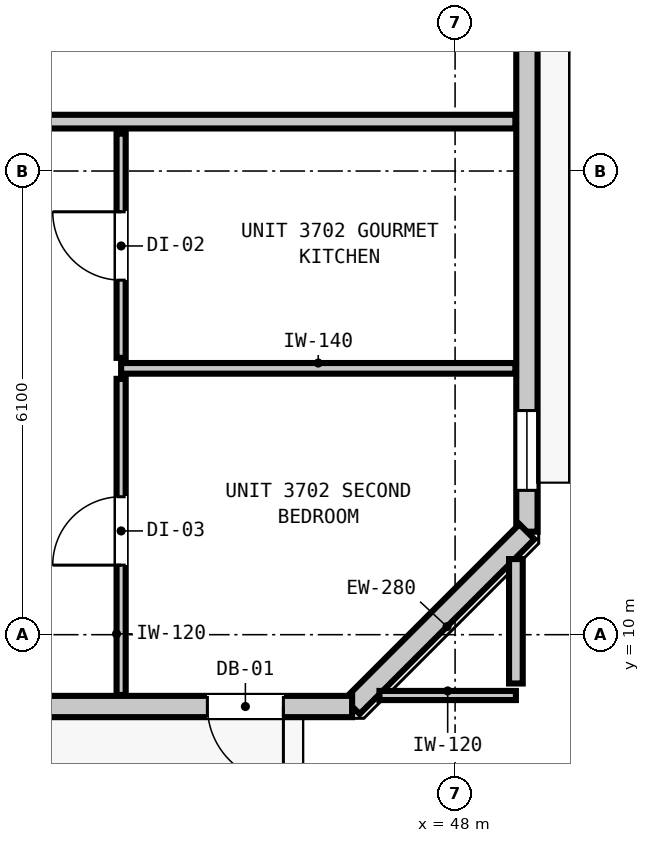
"""IFC4 building model, lengths in metres.
Left out: names, types, materials, properties, quantities, classifications, styles, units other than length and angle.
Written with IfcOpenShell. Run it as: python <this file> out.ifc"""

import sys

from ifc_helpers import new_model, si_unit, direction, frame, frame_2d, origin, place, context, subcontext, project, spatial, rectangle, extrude, element, fill, save


model = new_model("IFC4")
c1 = context("Model", 3, precision=1e-05, world=origin(), true_north=direction((0.0, 1.0)))
c2 = subcontext(c1, "Body", "Model", "MODEL_VIEW")
j1 = project(units=[si_unit("LENGTHUNIT", "METRE"), si_unit("PLANEANGLEUNIT", "RADIAN")], contexts=[c1])
p1 = place(None, origin())
s1 = spatial("IfcSite", under=j1, at=p1, CompositionType="ELEMENT")
p2 = place(p1, origin())
s2 = spatial("IfcBuilding", under=s1, at=p2, CompositionType="ELEMENT")
p3 = place(p2, frame((0.0, 0.0, 129.32)))
s3 = spatial("IfcBuildingStorey", under=s2, at=p3, CompositionType="ELEMENT", Elevation=129.32)
p4 = place(p3, frame((48.945, 43.645, 0.0), z_axis=(0.0, 0.0, 1.0), x_axis=(0.0, -1.0, 0.0)))
e1 = element("IfcWall", 1, at=p4, inside=s3, PredefinedType="STANDARD", context=c2, shape_type="SweptSolid", body=[
    extrude(rectangle(XDim=32.29, YDim=0.28, at=frame_2d((16.145, 0.0))), origin(), (0.0, 0.0, 1.0), 3.08),
])
p5 = place(p4, frame((5.467, 0.0, 0.0)))
e2 = element("IfcOpeningElement", 2, at=p5, cuts=e1, PredefinedType="OPENING", context=c2, shape_type="SweptSolid", body=[
    extrude(rectangle(XDim=1.0, YDim=2.15, at=frame_2d((0.5, 1.075))), frame((0.0, 0.15, 0.0), z_axis=(0.0, -1.0, 0.0), x_axis=(1.0, 0.0, 0.0)), (0.0, 0.0, 1.0), 0.3),
])
p6 = place(p4, frame((30.696, 0.0, 0.85)))
e3 = element("IfcOpeningElement", 3, at=p6, cuts=e1, PredefinedType="OPENING", context=c2, shape_type="SweptSolid", body=[
    extrude(rectangle(XDim=1.05, YDim=1.65, at=frame_2d((0.525, 0.825))), frame((0.0, 0.15, 0.0), z_axis=(0.0, -1.0, 0.0), x_axis=(1.0, 0.0, 0.0)), (0.0, 0.0, 1.0), 0.3),
])
p7 = place(p4, frame((14.761, 0.0, 0.85)))
e4 = element("IfcOpeningElement", 4, at=p7, cuts=e1, PredefinedType="OPENING", context=c2, shape_type="SweptSolid", body=[
    extrude(rectangle(XDim=1.8, YDim=1.9, at=frame_2d((0.9, 0.95))), frame((0.0, 0.15, 0.0), z_axis=(0.0, -1.0, 0.0), x_axis=(1.0, 0.0, 0.0)), (0.0, 0.0, 1.0), 0.3),
])
p8 = place(p4, frame((7.106, 0.0, 0.85)))
e5 = element("IfcOpeningElement", 5, at=p8, cuts=e1, PredefinedType="OPENING", context=c2, shape_type="SweptSolid", body=[
    extrude(rectangle(XDim=1.05, YDim=1.65, at=frame_2d((0.525, 0.825))), frame((0.0, 0.15, 0.0), z_axis=(0.0, -1.0, 0.0), x_axis=(1.0, 0.0, 0.0)), (0.0, 0.0, 1.0), 0.3),
])
p9 = place(p3, frame((48.945, 11.355, 0.0), z_axis=(0.0, 0.0, 1.0), x_axis=(-0.707106781187, -0.707106781187, 0.0)))
e6 = element("IfcWall", 6, at=p9, inside=s3, PredefinedType="STANDARD", context=c2, shape_type="SweptSolid", body=[
    extrude(rectangle(XDim=3.253, YDim=0.28, at=frame_2d((1.626, 0.0))), origin(), (0.0, 0.0, 1.0), 3.08),
])
p10 = place(p3, frame((46.645, 9.055, 0.0), z_axis=(0.0, 0.0, 1.0), x_axis=(-1.0, 0.0, 0.0)))
e7 = element("IfcWall", 7, at=p10, inside=s3, PredefinedType="STANDARD", context=c2, shape_type="SweptSolid", body=[
    extrude(rectangle(XDim=35.09, YDim=0.28, at=frame_2d((17.545, 0.0))), origin(), (0.0, 0.0, 1.0), 3.08),
])
p11 = place(p10, frame((0.904, 0.0, 0.0)))
e8 = element("IfcOpeningElement", 8, at=p11, cuts=e7, PredefinedType="OPENING", context=c2, shape_type="SweptSolid", body=[
    extrude(rectangle(XDim=1.0, YDim=2.15, at=frame_2d((0.5, 1.075))), frame((0.0, 0.15, 0.0), z_axis=(0.0, -1.0, 0.0), x_axis=(1.0, 0.0, 0.0)), (0.0, 0.0, 1.0), 0.3),
])
p12 = place(p10, frame((28.105, 0.0, 0.85)))
e9 = element("IfcOpeningElement", 9, at=p12, cuts=e7, PredefinedType="OPENING", context=c2, shape_type="SweptSolid", body=[
    extrude(rectangle(XDim=1.8, YDim=1.9, at=frame_2d((0.9, 0.95))), frame((0.0, 0.15, 0.0), z_axis=(0.0, -1.0, 0.0), x_axis=(1.0, 0.0, 0.0)), (0.0, 0.0, 1.0), 0.3),
])
p13 = place(p10, frame((34.133, 0.0, 0.85)))
e10 = element("IfcOpeningElement", 10, at=p13, cuts=e7, PredefinedType="OPENING", context=c2, shape_type="SweptSolid", body=[
    extrude(rectangle(XDim=0.58, YDim=1.5, at=frame_2d((0.29, 0.75))), frame((0.0, 0.15, 0.0), z_axis=(0.0, -1.0, 0.0), x_axis=(1.0, 0.0, 0.0)), (0.0, 0.0, 1.0), 0.3),
])
p14 = place(p10, frame((20.745, 0.0, 0.85)))
e11 = element("IfcOpeningElement", 11, at=p14, cuts=e7, PredefinedType="OPENING", context=c2, shape_type="SweptSolid", body=[
    extrude(rectangle(XDim=1.8, YDim=1.9, at=frame_2d((0.9, 0.95))), frame((0.0, 0.15, 0.0), z_axis=(0.0, -1.0, 0.0), x_axis=(1.0, 0.0, 0.0)), (0.0, 0.0, 1.0), 0.3),
])
p15 = place(p10, frame((14.873, 0.0, 0.85)))
e12 = element("IfcOpeningElement", 12, at=p15, cuts=e7, PredefinedType="OPENING", context=c2, shape_type="SweptSolid", body=[
    extrude(rectangle(XDim=1.8, YDim=1.9, at=frame_2d((0.9, 0.95))), frame((0.0, 0.15, 0.0), z_axis=(0.0, -1.0, 0.0), x_axis=(1.0, 0.0, 0.0)), (0.0, 0.0, 1.0), 0.3),
])
p16 = place(p10, frame((4.902, 0.0, 0.85)))
e13 = element("IfcOpeningElement", 13, at=p16, cuts=e7, PredefinedType="OPENING", context=c2, shape_type="SweptSolid", body=[
    extrude(rectangle(XDim=1.8, YDim=1.9, at=frame_2d((0.9, 0.95))), frame((0.0, 0.15, 0.0), z_axis=(0.0, -1.0, 0.0), x_axis=(1.0, 0.0, 0.0)), (0.0, 0.0, 1.0), 0.3),
])
p17 = place(p10, frame((11.723, 0.0, 0.85)))
e14 = element("IfcOpeningElement", 14, at=p17, cuts=e7, PredefinedType="OPENING", context=c2, shape_type="SweptSolid", body=[
    extrude(rectangle(XDim=1.8, YDim=1.9, at=frame_2d((0.9, 0.95))), frame((0.0, 0.15, 0.0), z_axis=(0.0, -1.0, 0.0), x_axis=(1.0, 0.0, 0.0)), (0.0, 0.0, 1.0), 0.3),
])
p18 = place(p3, frame((9.407, 16.75, 0.0), z_axis=(0.0, 0.0, 1.0), x_axis=(1.0, 0.0, 0.0)))
e15 = element("IfcWall", 15, at=p18, inside=s3, PredefinedType="PARTITIONING", context=c2, shape_type="SweptSolid", body=[
    extrude(rectangle(XDim=39.386, YDim=0.18, at=frame_2d((19.693, 0.0))), origin(), (0.0, 0.0, 1.0), 3.08),
])
p19 = place(p18, frame((8.773, 0.0, 0.0)))
e16 = element("IfcOpeningElement", 16, at=p19, cuts=e15, PredefinedType="OPENING", context=c2, shape_type="SweptSolid", body=[
    extrude(rectangle(XDim=1.0, YDim=2.15, at=frame_2d((0.5, 1.075))), frame((0.0, 0.1, 0.0), z_axis=(0.0, -1.0, 0.0), x_axis=(1.0, 0.0, 0.0)), (0.0, 0.0, 1.0), 0.2),
])
p20 = place(p18, frame((30.936, 0.0, 0.0)))
e17 = element("IfcOpeningElement", 17, at=p20, cuts=e15, PredefinedType="OPENING", context=c2, shape_type="SweptSolid", body=[
    extrude(rectangle(XDim=1.0, YDim=2.15, at=frame_2d((0.5, 1.075))), frame((0.0, 0.1, 0.0), z_axis=(0.0, -1.0, 0.0), x_axis=(1.0, 0.0, 0.0)), (0.0, 0.0, 1.0), 0.2),
])
p21 = place(p3, frame((43.606, 13.504, 0.0), z_axis=(0.0, 0.0, 1.0), x_axis=(1.0, 0.0, 0.0)))
e18 = element("IfcWall", 18, at=p21, inside=s3, PredefinedType="PARTITIONING", context=c2, shape_type="SweptSolid", body=[
    extrude(rectangle(XDim=5.187, YDim=0.14, at=frame_2d((2.594, 0.0))), origin(), (0.0, 0.0, 1.0), 3.08),
])
p22 = place(p3, frame((47.005, 9.2, 0.0), z_axis=(0.0, 0.0, 1.0), x_axis=(1.0, 0.0, 0.0)))
e19 = element("IfcWall", 19, at=p22, inside=s3, PredefinedType="PARTITIONING", context=c2, shape_type="SweptSolid", body=[
    extrude(rectangle(XDim=1.795, YDim=0.12, at=frame_2d((0.897, 0.0))), origin(), (0.0, 0.0, 1.0), 3.08),
])
p23 = place(p3, frame((48.8, 9.358, 0.0), z_axis=(0.0, 0.0, 1.0), x_axis=(0.0, 1.0, 0.0)))
e20 = element("IfcWall", 20, at=p23, inside=s3, PredefinedType="PARTITIONING", context=c2, shape_type="SweptSolid", body=[
    extrude(rectangle(XDim=1.637, YDim=0.18, at=frame_2d((0.819, 0.0))), origin(), (0.0, 0.0, 1.0), 3.08),
])
p24 = place(p3, frame((43.606, 9.207, 0.0), z_axis=(0.0, 0.0, 1.0), x_axis=(0.0, 1.0, 0.0)))
e21 = element("IfcWall", 21, at=p24, inside=s3, PredefinedType="PARTITIONING", context=c2, shape_type="SweptSolid", body=[
    extrude(rectangle(XDim=4.159, YDim=0.12, at=frame_2d((2.08, 0.0))), origin(), (0.0, 0.0, 1.0), 3.08),
])
p25 = place(p24, frame((1.708, 0.0, 0.0)))
e22 = element("IfcOpeningElement", 22, at=p25, cuts=e21, PredefinedType="OPENING", context=c2, shape_type="SweptSolid", body=[
    extrude(rectangle(XDim=0.9, YDim=2.1, at=frame_2d((0.45, 1.05))), frame((0.0, 0.07, 0.0), z_axis=(0.0, -1.0, 0.0), x_axis=(1.0, 0.0, 0.0)), (0.0, 0.0, 1.0), 0.14),
])
p26 = place(p3, frame((43.606, 13.642, 0.0), z_axis=(0.0, 0.0, 1.0), x_axis=(0.0, 1.0, 0.0)))
e23 = element("IfcWall", 23, at=p26, inside=s3, PredefinedType="PARTITIONING", context=c2, shape_type="SweptSolid", body=[
    extrude(rectangle(XDim=2.95, YDim=0.12, at=frame_2d((1.475, 0.0))), origin(), (0.0, 0.0, 1.0), 3.08),
])
p27 = place(p26, frame((1.022, 0.0, 0.0)))
e24 = element("IfcOpeningElement", 24, at=p27, cuts=e23, PredefinedType="OPENING", context=c2, shape_type="SweptSolid", body=[
    extrude(rectangle(XDim=0.9, YDim=2.1, at=frame_2d((0.45, 1.05))), frame((0.0, 0.07, 0.0), z_axis=(0.0, -1.0, 0.0), x_axis=(1.0, 0.0, 0.0)), (0.0, 0.0, 1.0), 0.14),
])
p28 = place(p11, origin())
e25 = element("IfcDoor", 25, at=p28, inside=s3, OperationType="SINGLE_SWING_LEFT", PredefinedType="DOOR", context=c2, shape_type="SweptSolid", body=[
    extrude(rectangle(XDim=1.0, YDim=2.15, at=frame_2d((0.5, 1.075))), frame((0.0, 0.025, 0.0), z_axis=(0.0, -1.0, 0.0), x_axis=(1.0, 0.0, 0.0)), (0.0, 0.0, 1.0), 0.05),
])
fill(e8, e25)
p29 = place(p6, origin())
e26 = element("IfcWindow", 26, at=p29, inside=s3, PartitioningType="SINGLE_PANEL", PredefinedType="WINDOW", context=c2, shape_type="SweptSolid", body=[
    extrude(rectangle(XDim=1.05, YDim=1.65, at=frame_2d((0.525, 0.825))), frame((0.0, 0.03, 0.0), z_axis=(0.0, -1.0, 0.0), x_axis=(1.0, 0.0, 0.0)), (0.0, 0.0, 1.0), 0.06),
])
fill(e3, e26)
p30 = place(p27, origin())
e27 = element("IfcDoor", 27, at=p30, inside=s3, OperationType="SINGLE_SWING_RIGHT", PredefinedType="DOOR", context=c2, shape_type="SweptSolid", body=[
    extrude(rectangle(XDim=0.9, YDim=2.1, at=frame_2d((0.45, 1.05))), frame((0.0, 0.025, 0.0), z_axis=(0.0, -1.0, 0.0), x_axis=(1.0, 0.0, 0.0)), (0.0, 0.0, 1.0), 0.05),
])
fill(e24, e27)
p31 = place(p25, origin())
e28 = element("IfcDoor", 28, at=p31, inside=s3, OperationType="SINGLE_SWING_LEFT", PredefinedType="DOOR", context=c2, shape_type="SweptSolid", body=[
    extrude(rectangle(XDim=0.9, YDim=2.1, at=frame_2d((0.45, 1.05))), frame((0.0, 0.025, 0.0), z_axis=(0.0, -1.0, 0.0), x_axis=(1.0, 0.0, 0.0)), (0.0, 0.0, 1.0), 0.05),
])
fill(e22, e28)
save(model, sys.argv[1])
